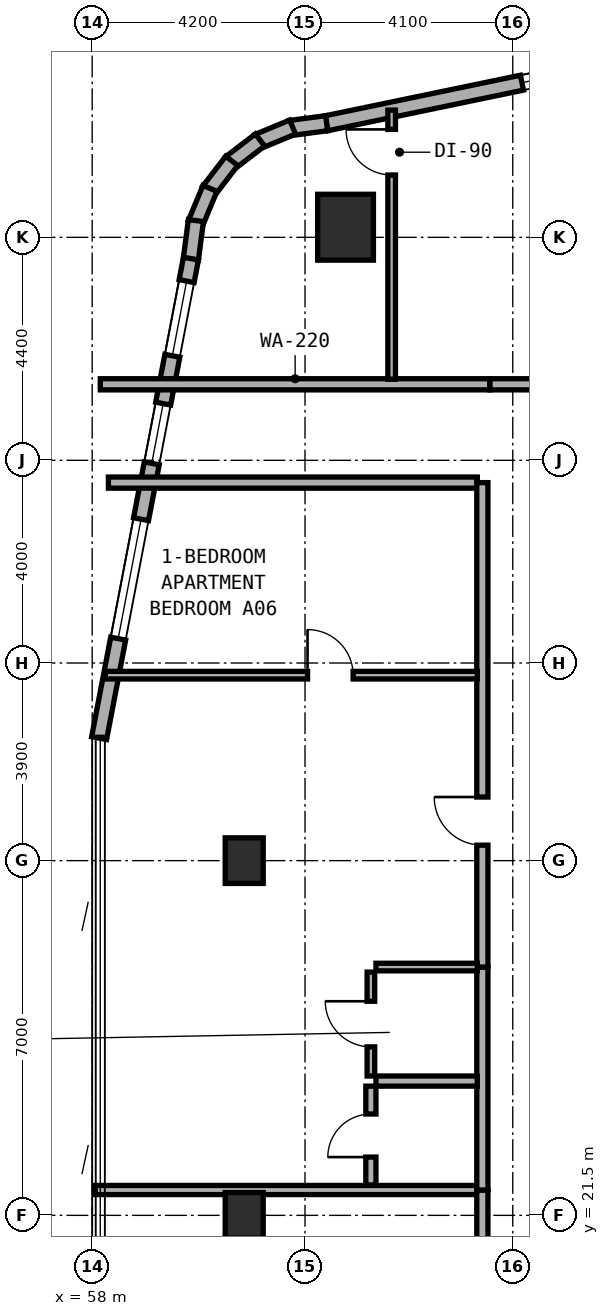
"""IFC4 building model, lengths in metres.
Left out: names, types, materials, properties, quantities, classifications, styles, units other than length and angle.
Written with IfcOpenShell. Run it as: python <this file> out.ifc"""

import sys

from ifc_helpers import new_model, si_unit, direction, frame, frame_2d, origin, origin_2d, place, context, subcontext, project, spatial, rectangle, extrude, element, fill, save


model = new_model("IFC4")
c1 = context("Model", 3, precision=1e-05, world=origin(), true_north=direction((0.0, 1.0)))
c2 = subcontext(c1, "Body", "Model", "MODEL_VIEW")
j1 = project(units=[si_unit("LENGTHUNIT", "METRE"), si_unit("PLANEANGLEUNIT", "RADIAN")], contexts=[c1])
p1 = place(None, origin())
s1 = spatial("IfcSite", under=j1, at=p1, CompositionType="ELEMENT")
p2 = place(p1, origin())
s2 = spatial("IfcBuilding", under=s1, at=p2, CompositionType="ELEMENT")
p3 = place(p2, frame((0.0, 0.0, 48.5)))
s3 = spatial("IfcBuildingStorey", under=s2, at=p3, CompositionType="ELEMENT", Elevation=48.5)
for number, where, z_axis, x_axis in (
    (1, (61.0, 21.5, 0.0), (0.0, 0.0, 1.0), (1.0, 0.0, 0.0)),
    (2, (61.0, 28.5, 0.0), (0.0, 0.0, 1.0), (1.0, 0.0, 0.0)),
):
    element("IfcColumn", number, at=place(p3, frame(where, z_axis=z_axis, x_axis=x_axis)), inside=s3, PredefinedType="COLUMN", context=c2, shape_type="SweptSolid", body=[
        extrude(rectangle(XDim=0.75, YDim=0.9, at=origin_2d()), origin(), (0.0, 0.0, 1.0), 3.5),
    ])
p4 = place(p3, frame((63.0, 41.0, 0.0), z_axis=(0.0, 0.0, 1.0), x_axis=(1.0, 0.0, 0.0)))
e3 = element("IfcColumn", 3, at=p4, inside=s3, PredefinedType="COLUMN", context=c2, shape_type="SweptSolid", body=[
    extrude(rectangle(XDim=1.1, YDim=1.3, at=origin_2d()), origin(), (0.0, 0.0, 1.0), 3.5),
])
p5 = place(p3, frame((71.326, 44.858, 0.0), z_axis=(0.0, 0.0, 1.0), x_axis=(-0.979124350489, -0.203262161453, 0.0)))
e4 = element("IfcWall", 4, at=p5, inside=s3, PredefinedType="STANDARD", context=c2, shape_type="SweptSolid", body=[
    extrude(rectangle(XDim=8.889, YDim=0.3, at=frame_2d((4.445, 0.0))), origin(), (0.0, 0.0, 1.0), 3.25),
])
p6 = place(p5, frame((2.548, 0.0, 0.8)))
e5 = element("IfcOpeningElement", 5, at=p6, cuts=e4, PredefinedType="OPENING", context=c2, shape_type="SweptSolid", body=[
    extrude(rectangle(XDim=2.4, YDim=1.6, at=frame_2d((1.2, 0.8))), frame((0.0, 0.16, 0.0), z_axis=(0.0, -1.0, 0.0), x_axis=(1.0, 0.0, 0.0)), (0.0, 0.0, 1.0), 0.32),
])
p7 = place(p3, frame((62.627, 43.052, 0.0), z_axis=(0.0, 0.0, 1.0), x_axis=(-0.991480488834, -0.130255288807, 0.0)))
e6 = element("IfcWall", 6, at=p7, inside=s3, PredefinedType="STANDARD", context=c2, shape_type="SweptSolid", body=[
    extrude(rectangle(XDim=0.729, YDim=0.3, at=frame_2d((0.365, 0.0))), origin(), (0.0, 0.0, 1.0), 3.25),
])
for number, where, z_axis, x_axis in (
    (7, (61.955, 42.976, 0.0), (0.0, 0.0, 1.0), (-0.924, -0.384, 0.0)),
    (8, (61.311, 42.721, 0.0), (0.0, 0.0, 1.0), (-0.794, -0.608, 0.0)),
    (9, (60.754, 42.309, 0.0), (0.0, 0.0, 1.0), (-0.608, -0.794, 0.0)),
    (10, (60.324, 41.766, 0.0), (0.0, 0.0, 1.0), (-0.383, -0.924, 0.0)),
):
    element("IfcWall", number, at=place(p3, frame(where, z_axis=z_axis, x_axis=x_axis)), inside=s3, PredefinedType="STANDARD", context=c2, shape_type="SweptSolid", body=[
        extrude(rectangle(XDim=0.746, YDim=0.3, at=frame_2d((0.373, 0.0))), origin(), (0.0, 0.0, 1.0), 3.25),
    ])
p8 = place(p3, frame((60.047, 41.131, 0.0), z_axis=(0.0, 0.0, 1.0), x_axis=(-0.129653178221, -0.991559404866, 0.0)))
e11 = element("IfcWall", 11, at=p8, inside=s3, PredefinedType="STANDARD", context=c2, shape_type="SweptSolid", body=[
    extrude(rectangle(XDim=0.764, YDim=0.3, at=frame_2d((0.382, 0.0))), origin(), (0.0, 0.0, 1.0), 3.25),
])
p9 = place(p3, frame((59.949, 40.38, 0.0), z_axis=(0.0, 0.0, 1.0), x_axis=(-0.188087874316, -0.982152203854, 0.0)))
e12 = element("IfcWall", 12, at=p9, inside=s3, PredefinedType="STANDARD", context=c2, shape_type="SweptSolid", body=[
    extrude(rectangle(XDim=9.634, YDim=0.3, at=frame_2d((4.817, 0.0))), origin(), (0.0, 0.0, 1.0), 3.25),
])
p10 = place(p9, frame((0.452, 0.0, 0.85)))
e13 = element("IfcOpeningElement", 13, at=p10, cuts=e12, PredefinedType="OPENING", context=c2, shape_type="SweptSolid", body=[
    extrude(rectangle(XDim=1.5, YDim=1.5, at=frame_2d((0.75, 0.75))), frame((0.0, 0.16, 0.0), z_axis=(0.0, -1.0, 0.0), x_axis=(1.0, 0.0, 0.0)), (0.0, 0.0, 1.0), 0.32),
])
p11 = place(p9, frame((2.913, 0.0, 0.85)))
e14 = element("IfcOpeningElement", 14, at=p11, cuts=e12, PredefinedType="OPENING", context=c2, shape_type="SweptSolid", body=[
    extrude(rectangle(XDim=1.2, YDim=1.5, at=frame_2d((0.6, 0.75))), frame((0.0, 0.16, 0.0), z_axis=(0.0, -1.0, 0.0), x_axis=(1.0, 0.0, 0.0)), (0.0, 0.0, 1.0), 0.32),
])
p12 = place(p9, frame((5.235, 0.0, 0.8)))
e15 = element("IfcOpeningElement", 15, at=p12, cuts=e12, PredefinedType="OPENING", context=c2, shape_type="SweptSolid", body=[
    extrude(rectangle(XDim=2.4, YDim=1.6, at=frame_2d((1.2, 0.8))), frame((0.0, 0.16, 0.0), z_axis=(0.0, -1.0, 0.0), x_axis=(1.0, 0.0, 0.0)), (0.0, 0.0, 1.0), 0.32),
])
p13 = place(p3, frame((58.16, 37.9, 0.0), z_axis=(0.0, 0.0, 1.0), x_axis=(1.0, 0.0, 0.0)))
e16 = element("IfcWall", 16, at=p13, inside=s3, PredefinedType="SOLIDWALL", context=c2, shape_type="SweptSolid", body=[
    extrude(rectangle(XDim=7.69, YDim=0.22, at=frame_2d((3.845, 0.0))), origin(), (0.0, 0.0, 1.0), 2.865),
])
p14 = place(p3, frame((65.85, 37.9, 0.0), z_axis=(0.0, 0.0, 1.0), x_axis=(1.0, 0.0, 0.0)))
e17 = element("IfcWall", 17, at=p14, inside=s3, PredefinedType="SOLIDWALL", context=c2, shape_type="SweptSolid", body=[
    extrude(rectangle(XDim=8.87, YDim=0.22, at=frame_2d((4.435, 0.0))), origin(), (0.0, 0.0, 1.0), 2.725),
])
p15 = place(p14, frame((3.96, 0.0, 0.0)))
e18 = element("IfcOpeningElement", 18, at=p15, cuts=e17, PredefinedType="OPENING", context=c2, shape_type="SweptSolid", body=[
    extrude(rectangle(XDim=0.95, YDim=2.1, at=frame_2d((0.475, 1.05))), frame((0.0, 0.12, 0.0), z_axis=(0.0, -1.0, 0.0), x_axis=(1.0, 0.0, 0.0)), (0.0, 0.0, 1.0), 0.24),
])
p16 = place(p3, frame((63.91, 38.0, 0.0), z_axis=(0.0, 0.0, 1.0), x_axis=(0.0, 1.0, 0.0)))
e19 = element("IfcWall", 19, at=p16, inside=s3, PredefinedType="PARTITIONING", context=c2, shape_type="SweptSolid", body=[
    extrude(rectangle(XDim=5.311, YDim=0.15, at=frame_2d((2.656, 0.0))), origin(), (0.0, 0.0, 1.0), 2.865),
])
p17 = place(p16, frame((4.03, 0.0, 0.0)))
e20 = element("IfcOpeningElement", 20, at=p17, cuts=e19, PredefinedType="OPENING", context=c2, shape_type="SweptSolid", body=[
    extrude(rectangle(XDim=0.9, YDim=2.1, at=frame_2d((0.45, 1.05))), frame((0.0, 0.085, 0.0), z_axis=(0.0, -1.0, 0.0), x_axis=(1.0, 0.0, 0.0)), (0.0, 0.0, 1.0), 0.17),
])
p18 = place(p3, frame((58.32, 35.96, 0.0), z_axis=(0.0, 0.0, 1.0), x_axis=(1.0, 0.0, 0.0)))
e21 = element("IfcWall", 21, at=p18, inside=s3, PredefinedType="SOLIDWALL", context=c2, shape_type="SweptSolid", body=[
    extrude(rectangle(XDim=7.28, YDim=0.22, at=frame_2d((3.64, 0.0))), origin(), (0.0, 0.0, 1.0), 2.865),
])
p19 = place(p3, frame((58.06, 22.0, 0.0), z_axis=(0.0, 0.0, 1.0), x_axis=(1.0, 0.0, 0.0)))
e22 = element("IfcWall", 22, at=p19, inside=s3, PredefinedType="SOLIDWALL", context=c2, shape_type="SweptSolid", body=[
    extrude(rectangle(XDim=7.64, YDim=0.18, at=frame_2d((3.82, 0.0))), origin(), (0.0, 0.0, 1.0), 2.865),
])
p20 = place(p3, frame((65.7, 18.44, 0.0), z_axis=(0.0, 0.0, 1.0), x_axis=(0.0, 1.0, 0.0)))
e23 = element("IfcWall", 23, at=p20, inside=s3, PredefinedType="SOLIDWALL", context=c2, shape_type="SweptSolid", body=[
    extrude(rectangle(XDim=3.56, YDim=0.22, at=frame_2d((1.78, 0.0))), origin(), (0.0, 0.0, 1.0), 2.725),
])
p21 = place(p20, frame((1.305, 0.0, 0.0)))
e24 = element("IfcOpeningElement", 24, at=p21, cuts=e23, PredefinedType="OPENING", context=c2, shape_type="SweptSolid", body=[
    extrude(rectangle(XDim=0.95, YDim=2.1, at=frame_2d((0.475, 1.05))), frame((0.0, 0.12, 0.0), z_axis=(0.0, -1.0, 0.0), x_axis=(1.0, 0.0, 0.0)), (0.0, 0.0, 1.0), 0.24),
])
p22 = place(p3, frame((65.7, 22.0, 0.0), z_axis=(0.0, 0.0, 1.0), x_axis=(0.0, 1.0, 0.0)))
e25 = element("IfcWall", 25, at=p22, inside=s3, PredefinedType="SOLIDWALL", context=c2, shape_type="SweptSolid", body=[
    extrude(rectangle(XDim=4.4, YDim=0.22, at=frame_2d((2.2, 0.0))), origin(), (0.0, 0.0, 1.0), 3.22),
])
p23 = place(p3, frame((65.7, 26.4, 0.0), z_axis=(0.0, 0.0, 1.0), x_axis=(0.0, 1.0, 0.0)))
e26 = element("IfcWall", 26, at=p23, inside=s3, PredefinedType="SOLIDWALL", context=c2, shape_type="SweptSolid", body=[
    extrude(rectangle(XDim=9.56, YDim=0.22, at=frame_2d((4.78, 0.0))), origin(), (0.0, 0.0, 1.0), 2.725),
])
p24 = place(p23, frame((2.405, 0.0, 0.0)))
e27 = element("IfcOpeningElement", 27, at=p24, cuts=e26, PredefinedType="OPENING", context=c2, shape_type="SweptSolid", body=[
    extrude(rectangle(XDim=0.95, YDim=2.1, at=frame_2d((0.475, 1.05))), frame((0.0, 0.12, 0.0), z_axis=(0.0, -1.0, 0.0), x_axis=(1.0, 0.0, 0.0)), (0.0, 0.0, 1.0), 0.24),
])
p25 = place(p3, frame((58.26, 32.16, 0.0), z_axis=(0.0, 0.0, 1.0), x_axis=(1.0, 0.0, 0.0)))
e28 = element("IfcWall", 28, at=p25, inside=s3, PredefinedType="PARTITIONING", context=c2, shape_type="SweptSolid", body=[
    extrude(rectangle(XDim=7.34, YDim=0.15, at=frame_2d((3.67, 0.0))), origin(), (0.0, 0.0, 1.0), 2.865),
])
p26 = place(p25, frame((3.99, 0.0, 0.0)))
e29 = element("IfcOpeningElement", 29, at=p26, cuts=e28, PredefinedType="OPENING", context=c2, shape_type="SweptSolid", body=[
    extrude(rectangle(XDim=0.9, YDim=2.1, at=frame_2d((0.45, 1.05))), frame((0.0, 0.085, 0.0), z_axis=(0.0, -1.0, 0.0), x_axis=(1.0, 0.0, 0.0)), (0.0, 0.0, 1.0), 0.17),
])
p27 = place(p3, frame((63.6, 24.15, 0.0), z_axis=(0.0, 0.0, 1.0), x_axis=(1.0, 0.0, 0.0)))
e30 = element("IfcWall", 30, at=p27, inside=s3, PredefinedType="PLUMBINGWALL", context=c2, shape_type="SweptSolid", body=[
    extrude(rectangle(XDim=2.0, YDim=0.2, at=frame_2d((1.0, 0.0))), origin(), (0.0, 0.0, 1.0), 3.22),
])
p28 = place(p3, frame((63.6, 26.4, 0.0), z_axis=(0.0, 0.0, 1.0), x_axis=(1.0, 0.0, 0.0)))
e31 = element("IfcWall", 31, at=p28, inside=s3, PredefinedType="PARTITIONING", context=c2, shape_type="SweptSolid", body=[
    extrude(rectangle(XDim=2.0, YDim=0.15, at=frame_2d((1.0, 0.0))), origin(), (0.0, 0.0, 1.0), 3.22),
])
p29 = place(p3, frame((63.5, 22.1, 0.0), z_axis=(0.0, 0.0, 1.0), x_axis=(0.0, 1.0, 0.0)))
e32 = element("IfcWall", 32, at=p29, inside=s3, PredefinedType="PLUMBINGWALL", context=c2, shape_type="SweptSolid", body=[
    extrude(rectangle(XDim=1.95, YDim=0.2, at=frame_2d((0.975, 0.0))), origin(), (0.0, 0.0, 1.0), 3.22),
])
p30 = place(p29, frame((0.55, 0.0, 0.0)))
e33 = element("IfcOpeningElement", 33, at=p30, cuts=e32, PredefinedType="OPENING", context=c2, shape_type="SweptSolid", body=[
    extrude(rectangle(XDim=0.85, YDim=2.1, at=frame_2d((0.425, 1.05))), frame((0.0, 0.11, 0.0), z_axis=(0.0, -1.0, 0.0), x_axis=(1.0, 0.0, 0.0)), (0.0, 0.0, 1.0), 0.22),
])
p31 = place(p3, frame((63.5, 24.25, 0.0), z_axis=(0.0, 0.0, 1.0), x_axis=(0.0, 1.0, 0.0)))
e34 = element("IfcWall", 34, at=p31, inside=s3, PredefinedType="PARTITIONING", context=c2, shape_type="SweptSolid", body=[
    extrude(rectangle(XDim=2.05, YDim=0.15, at=frame_2d((1.025, 0.0))), origin(), (0.0, 0.0, 1.0), 3.22),
])
p32 = place(p31, frame((0.575, 0.0, 0.0)))
e35 = element("IfcOpeningElement", 35, at=p32, cuts=e34, PredefinedType="OPENING", context=c2, shape_type="SweptSolid", body=[
    extrude(rectangle(XDim=0.9, YDim=2.1, at=frame_2d((0.45, 1.05))), frame((0.0, 0.085, 0.0), z_axis=(0.0, -1.0, 0.0), x_axis=(1.0, 0.0, 0.0)), (0.0, 0.0, 1.0), 0.17),
])
p33 = place(p6, origin())
e36 = element("IfcWindow", 36, at=p33, inside=s3, PartitioningType="SINGLE_PANEL", PredefinedType="WINDOW", context=c2, shape_type="SweptSolid", body=[
    extrude(rectangle(XDim=2.4, YDim=1.6, at=frame_2d((1.2, 0.8))), frame((0.0, 0.03, 0.0), z_axis=(0.0, -1.0, 0.0), x_axis=(1.0, 0.0, 0.0)), (0.0, 0.0, 1.0), 0.06),
])
fill(e5, e36)
p34 = place(p10, origin())
e37 = element("IfcWindow", 37, at=p34, inside=s3, PartitioningType="SINGLE_PANEL", PredefinedType="WINDOW", context=c2, shape_type="SweptSolid", body=[
    extrude(rectangle(XDim=1.5, YDim=1.5, at=frame_2d((0.75, 0.75))), frame((0.0, 0.03, 0.0), z_axis=(0.0, -1.0, 0.0), x_axis=(1.0, 0.0, 0.0)), (0.0, 0.0, 1.0), 0.06),
])
fill(e13, e37)
p35 = place(p11, origin())
e38 = element("IfcWindow", 38, at=p35, inside=s3, PartitioningType="SINGLE_PANEL", PredefinedType="WINDOW", context=c2, shape_type="SweptSolid", body=[
    extrude(rectangle(XDim=1.2, YDim=1.5, at=frame_2d((0.6, 0.75))), frame((0.0, 0.03, 0.0), z_axis=(0.0, -1.0, 0.0), x_axis=(1.0, 0.0, 0.0)), (0.0, 0.0, 1.0), 0.06),
])
fill(e14, e38)
p36 = place(p12, origin())
e39 = element("IfcWindow", 39, at=p36, inside=s3, PartitioningType="SINGLE_PANEL", PredefinedType="WINDOW", context=c2, shape_type="SweptSolid", body=[
    extrude(rectangle(XDim=2.4, YDim=1.6, at=frame_2d((1.2, 0.8))), frame((0.0, 0.03, 0.0), z_axis=(0.0, -1.0, 0.0), x_axis=(1.0, 0.0, 0.0)), (0.0, 0.0, 1.0), 0.06),
])
fill(e15, e39)
p37 = place(p17, origin())
e40 = element("IfcDoor", 40, at=p37, inside=s3, OperationType="SINGLE_SWING_RIGHT", PredefinedType="DOOR", context=c2, shape_type="SweptSolid", body=[
    extrude(rectangle(XDim=0.9, YDim=2.1, at=frame_2d((0.45, 1.05))), frame((0.0, 0.025, 0.0), z_axis=(0.0, -1.0, 0.0), x_axis=(1.0, 0.0, 0.0)), (0.0, 0.0, 1.0), 0.05),
])
fill(e20, e40)
p38 = place(p24, origin())
e41 = element("IfcDoor", 41, at=p38, inside=s3, OperationType="SINGLE_SWING_RIGHT", PredefinedType="DOOR", context=c2, shape_type="SweptSolid", body=[
    extrude(rectangle(XDim=0.95, YDim=2.1, at=frame_2d((0.475, 1.05))), frame((0.0, 0.025, 0.0), z_axis=(0.0, -1.0, 0.0), x_axis=(1.0, 0.0, 0.0)), (0.0, 0.0, 1.0), 0.05),
])
fill(e27, e41)
p39 = place(p26, origin())
e42 = element("IfcDoor", 42, at=p39, inside=s3, OperationType="SINGLE_SWING_LEFT", PredefinedType="DOOR", context=c2, shape_type="SweptSolid", body=[
    extrude(rectangle(XDim=0.9, YDim=2.1, at=frame_2d((0.45, 1.05))), frame((0.0, 0.025, 0.0), z_axis=(0.0, -1.0, 0.0), x_axis=(1.0, 0.0, 0.0)), (0.0, 0.0, 1.0), 0.05),
])
fill(e29, e42)
p40 = place(p30, origin())
e43 = element("IfcDoor", 43, at=p40, inside=s3, OperationType="SINGLE_SWING_LEFT", PredefinedType="DOOR", context=c2, shape_type="SweptSolid", body=[
    extrude(rectangle(XDim=0.85, YDim=2.1, at=frame_2d((0.425, 1.05))), frame((0.0, 0.025, 0.0), z_axis=(0.0, -1.0, 0.0), x_axis=(1.0, 0.0, 0.0)), (0.0, 0.0, 1.0), 0.05),
])
fill(e33, e43)
p41 = place(p32, origin())
e44 = element("IfcDoor", 44, at=p41, inside=s3, OperationType="SINGLE_SWING_RIGHT", PredefinedType="DOOR", context=c2, shape_type="SweptSolid", body=[
    extrude(rectangle(XDim=0.9, YDim=2.1, at=frame_2d((0.45, 1.05))), frame((0.0, 0.025, 0.0), z_axis=(0.0, -1.0, 0.0), x_axis=(1.0, 0.0, 0.0)), (0.0, 0.0, 1.0), 0.05),
])
fill(e35, e44)
save(model, sys.argv[1])
